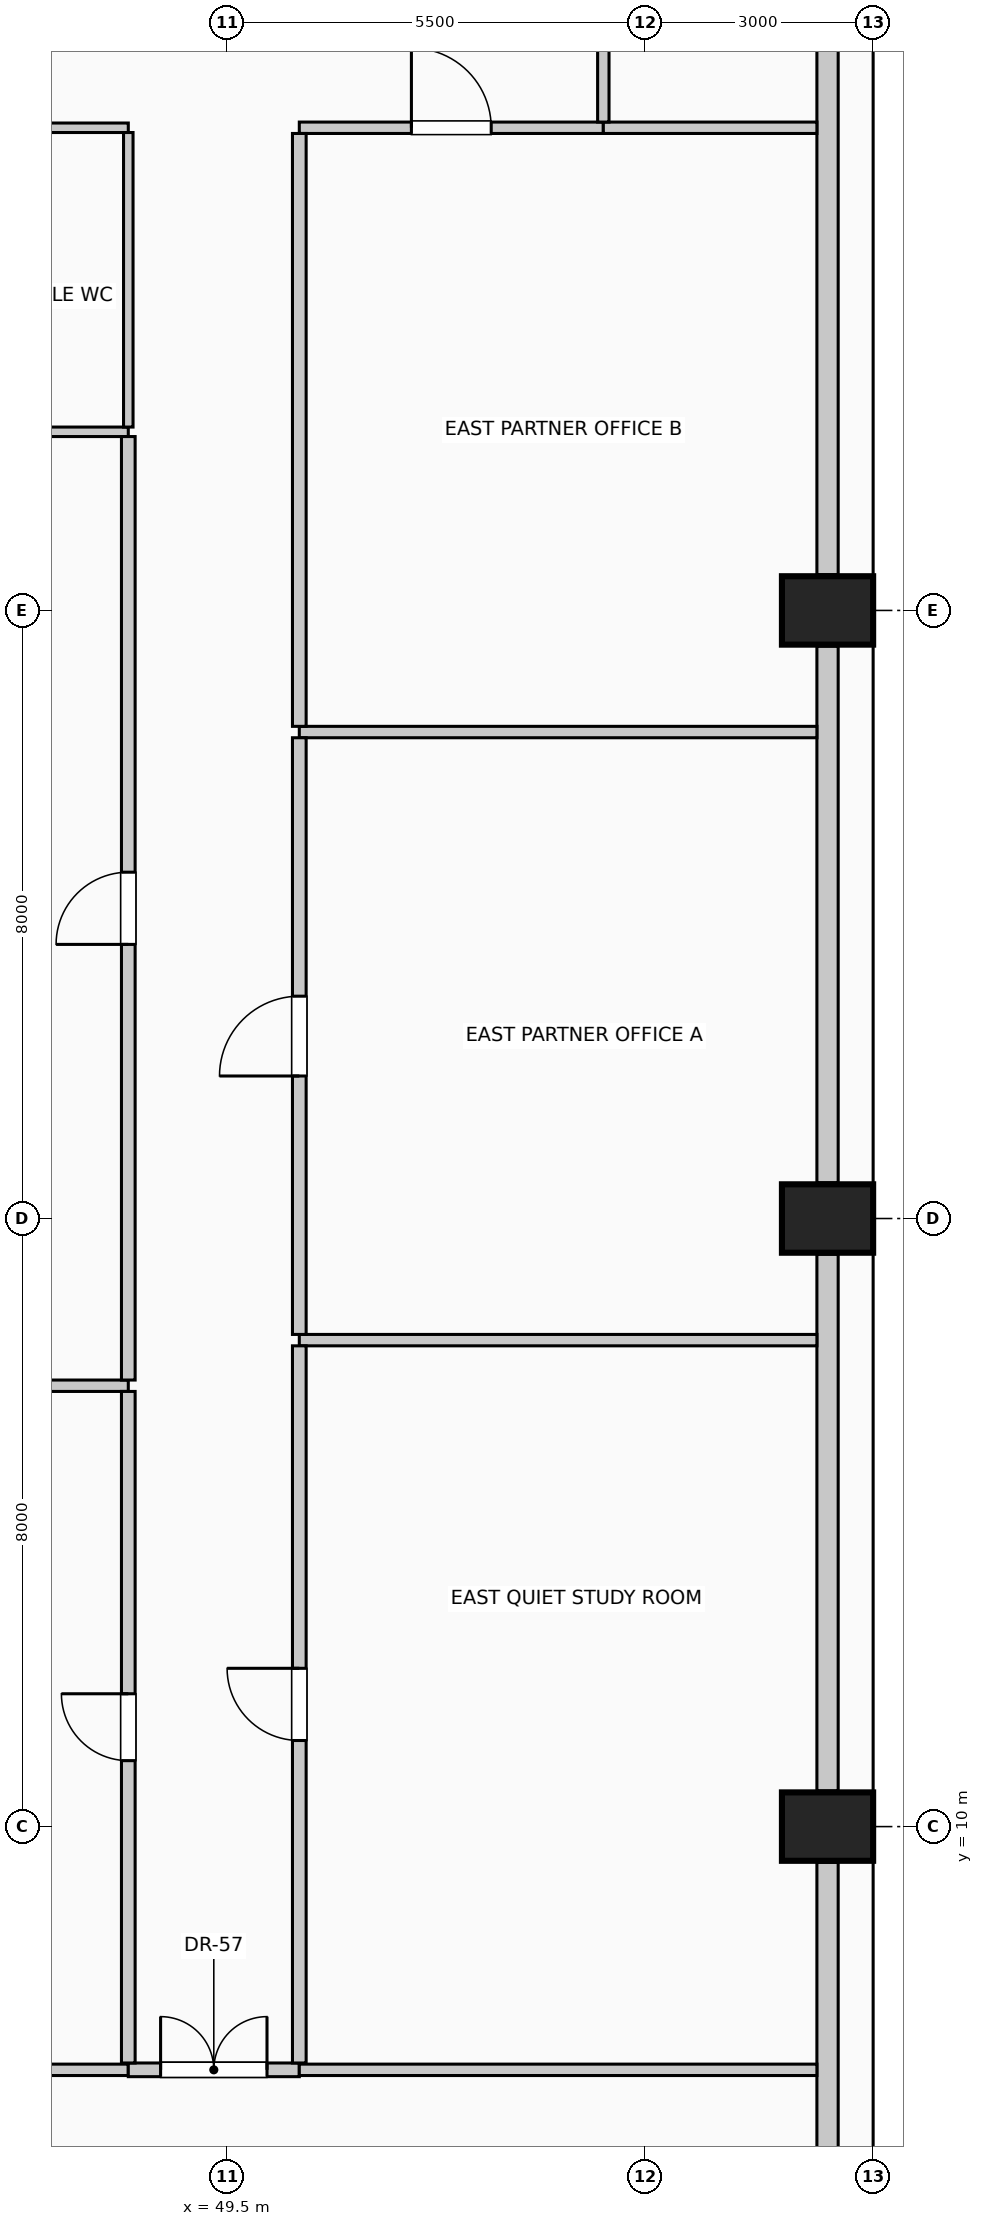
"""IFC4 building model, lengths in metres.
Left out: names, types, materials, properties, quantities, classifications, styles, units other than length and angle.
Written with IfcOpenShell. Run it as: python <this file> out.ifc"""

import sys

from ifc_helpers import new_model, si_unit, direction, frame, frame_2d, origin, origin_2d, place, context, subcontext, project, spatial, rectangle, extrude, element, fill, save


model = new_model("IFC4")
c1 = context("Model", 3, precision=1e-05, world=origin(), true_north=direction((0.0, 1.0)))
c2 = subcontext(c1, "Body", "Model", "MODEL_VIEW")
j1 = project(units=[si_unit("LENGTHUNIT", "METRE"), si_unit("PLANEANGLEUNIT", "RADIAN")], contexts=[c1])
p1 = place(None, origin())
s1 = spatial("IfcSite", under=j1, at=p1, CompositionType="ELEMENT")
p2 = place(p1, origin())
s2 = spatial("IfcBuilding", under=s1, at=p2, CompositionType="ELEMENT")
p3 = place(p2, frame((0.0, 0.0, 38.6)))
s3 = spatial("IfcBuildingStorey", under=s2, at=p3, CompositionType="ELEMENT", Elevation=38.6)
for number, where, z_axis, x_axis in (
    (1, (57.4, 10.0, 0.0), (0.0, 0.0, 1.0), (0.0, 1.0, 0.0)),
    (2, (57.4, 18.0, 0.0), (0.0, 0.0, 1.0), (0.0, 1.0, 0.0)),
    (3, (57.4, 26.0, 0.0), (0.0, 0.0, 1.0), (0.0, 1.0, 0.0)),
):
    element("IfcColumn", number, at=place(p3, frame(where, z_axis=z_axis, x_axis=x_axis)), inside=s3, PredefinedType="COLUMN", context=c2, shape_type="SweptSolid", body=[
        extrude(rectangle(XDim=0.9, YDim=1.2, at=origin_2d()), origin(), (0.0, 0.0, 1.0), 4.0),
    ])
p4 = place(p3, frame((57.4, 9.53, 0.0), z_axis=(0.0, 0.0, 1.0), x_axis=(0.0, -1.0, 0.0)))
e4 = element("IfcWall", 4, at=p4, inside=s3, PredefinedType="SOLIDWALL", context=c2, shape_type="SweptSolid", body=[
    extrude(rectangle(XDim=5.46, YDim=0.28, at=frame_2d((2.73, 0.0))), origin(), (0.0, 0.0, 1.0), 2.85),
])
for number, where, z_axis, x_axis in (
    (5, (57.4, 17.53, 0.0), (0.0, 0.0, 1.0), (0.0, -1.0, 0.0)),
    (6, (57.4, 25.53, 0.0), (0.0, 0.0, 1.0), (0.0, -1.0, 0.0)),
    (7, (57.4, 33.53, 0.0), (0.0, 0.0, 1.0), (0.0, -1.0, 0.0)),
):
    element("IfcWall", number, at=place(p3, frame(where, z_axis=z_axis, x_axis=x_axis)), inside=s3, PredefinedType="SOLIDWALL", context=c2, shape_type="SweptSolid", body=[
        extrude(rectangle(XDim=7.06, YDim=0.28, at=frame_2d((3.53, 0.0))), origin(), (0.0, 0.0, 1.0), 2.85),
    ])
p5 = place(p3, frame((41.12, 6.8, 0.0), z_axis=(0.0, 0.0, 1.0), x_axis=(1.0, 0.0, 0.0)))
e8 = element("IfcWall", 8, at=p5, inside=s3, PredefinedType="PARTITIONING", context=c2, shape_type="SweptSolid", body=[
    extrude(rectangle(XDim=7.08, YDim=0.15, at=frame_2d((3.54, 0.0))), origin(), (0.0, 0.0, 1.0), 3.095),
])
p6 = place(p3, frame((48.2, 6.8, 0.0), z_axis=(0.0, 0.0, 1.0), x_axis=(1.0, 0.0, 0.0)))
e9 = element("IfcWall", 9, at=p6, inside=s3, PredefinedType="PARTITIONING", context=c2, shape_type="SweptSolid", body=[
    extrude(rectangle(XDim=2.25, YDim=0.18, at=frame_2d((1.125, 0.0))), origin(), (0.0, 0.0, 1.0), 3.095),
])
p7 = place(p6, frame((0.425, 0.0, 0.0)))
e10 = element("IfcOpeningElement", 10, at=p7, cuts=e9, PredefinedType="OPENING", context=c2, shape_type="SweptSolid", body=[
    extrude(rectangle(XDim=1.4, YDim=2.2, at=frame_2d((0.7, 1.1))), frame((0.0, 0.1, 0.0), z_axis=(0.0, -1.0, 0.0), x_axis=(1.0, 0.0, 0.0)), (0.0, 0.0, 1.0), 0.2),
])
p8 = place(p3, frame((50.45, 6.8, 0.0), z_axis=(0.0, 0.0, 1.0), x_axis=(1.0, 0.0, 0.0)))
e11 = element("IfcWall", 11, at=p8, inside=s3, PredefinedType="PARTITIONING", context=c2, shape_type="SweptSolid", body=[
    extrude(rectangle(XDim=6.81, YDim=0.15, at=frame_2d((3.405, 0.0))), origin(), (0.0, 0.0, 1.0), 3.095),
])
p9 = place(p3, frame((41.12, 15.8, 0.0), z_axis=(0.0, 0.0, 1.0), x_axis=(1.0, 0.0, 0.0)))
e12 = element("IfcWall", 12, at=p9, inside=s3, PredefinedType="PARTITIONING", context=c2, shape_type="SweptSolid", body=[
    extrude(rectangle(XDim=7.08, YDim=0.15, at=frame_2d((3.54, 0.0))), origin(), (0.0, 0.0, 1.0), 3.7),
])
for number, where, z_axis, x_axis in (
    (13, (50.45, 16.4, 0.0), (0.0, 0.0, 1.0), (1.0, 0.0, 0.0)),
    (14, (50.45, 24.4, 0.0), (0.0, 0.0, 1.0), (1.0, 0.0, 0.0)),
):
    element("IfcWall", number, at=place(p3, frame(where, z_axis=z_axis, x_axis=x_axis)), inside=s3, PredefinedType="PARTITIONING", context=c2, shape_type="SweptSolid", body=[
        extrude(rectangle(XDim=6.81, YDim=0.15, at=frame_2d((3.405, 0.0))), origin(), (0.0, 0.0, 1.0), 3.7),
    ])
p10 = place(p3, frame((44.2, 28.35, 0.0), z_axis=(0.0, 0.0, 1.0), x_axis=(1.0, 0.0, 0.0)))
e15 = element("IfcWall", 15, at=p10, inside=s3, PredefinedType="PARTITIONING", context=c2, shape_type="SweptSolid", body=[
    extrude(rectangle(XDim=4.0, YDim=0.125, at=frame_2d((2.0, 0.0))), origin(), (0.0, 0.0, 1.0), 3.7),
])
p11 = place(p3, frame((44.2, 32.35, 0.0), z_axis=(0.0, 0.0, 1.0), x_axis=(1.0, 0.0, 0.0)))
e16 = element("IfcWall", 16, at=p11, inside=s3, PredefinedType="PARTITIONING", context=c2, shape_type="SweptSolid", body=[
    extrude(rectangle(XDim=4.0, YDim=0.125, at=frame_2d((2.0, 0.0))), origin(), (0.0, 0.0, 1.0), 3.7),
])
p12 = place(p11, frame((1.54, 0.0, 0.0)))
e17 = element("IfcOpeningElement", 17, at=p12, cuts=e16, PredefinedType="OPENING", context=c2, shape_type="SweptSolid", body=[
    extrude(rectangle(XDim=0.92, YDim=2.1, at=frame_2d((0.46, 1.05))), frame((0.0, 0.073, 0.0), z_axis=(0.0, -1.0, 0.0), x_axis=(1.0, 0.0, 0.0)), (0.0, 0.0, 1.0), 0.145),
])
p13 = place(p3, frame((50.45, 32.35, 0.0), z_axis=(0.0, 0.0, 1.0), x_axis=(1.0, 0.0, 0.0)))
e18 = element("IfcWall", 18, at=p13, inside=s3, PredefinedType="PARTITIONING", context=c2, shape_type="SweptSolid", body=[
    extrude(rectangle(XDim=4.0, YDim=0.15, at=frame_2d((2.0, 0.0))), origin(), (0.0, 0.0, 1.0), 3.7),
])
p14 = place(p13, frame((1.475, 0.0, 0.0)))
e19 = element("IfcOpeningElement", 19, at=p14, cuts=e18, PredefinedType="OPENING", context=c2, shape_type="SweptSolid", body=[
    extrude(rectangle(XDim=1.05, YDim=2.15, at=frame_2d((0.525, 1.075))), frame((0.0, 0.085, 0.0), z_axis=(0.0, -1.0, 0.0), x_axis=(1.0, 0.0, 0.0)), (0.0, 0.0, 1.0), 0.17),
])
p15 = place(p3, frame((54.45, 32.35, 0.0), z_axis=(0.0, 0.0, 1.0), x_axis=(1.0, 0.0, 0.0)))
e20 = element("IfcWall", 20, at=p15, inside=s3, PredefinedType="PARTITIONING", context=c2, shape_type="SweptSolid", body=[
    extrude(rectangle(XDim=2.81, YDim=0.15, at=frame_2d((1.405, 0.0))), origin(), (0.0, 0.0, 1.0), 3.7),
])
p16 = place(p3, frame((48.2, 6.89, 0.0), z_axis=(0.0, 0.0, 1.0), x_axis=(0.0, 1.0, 0.0)))
e21 = element("IfcWall", 21, at=p16, inside=s3, PredefinedType="PARTITIONING", context=c2, shape_type="SweptSolid", body=[
    extrude(rectangle(XDim=8.835, YDim=0.18, at=frame_2d((4.417, 0.0))), origin(), (0.0, 0.0, 1.0), 3.7),
])
p17 = place(p16, frame((3.978, 0.0, 0.0)))
e22 = element("IfcOpeningElement", 22, at=p17, cuts=e21, PredefinedType="OPENING", context=c2, shape_type="SweptSolid", body=[
    extrude(rectangle(XDim=0.88, YDim=2.1, at=frame_2d((0.44, 1.05))), frame((0.0, 0.1, 0.0), z_axis=(0.0, -1.0, 0.0), x_axis=(1.0, 0.0, 0.0)), (0.0, 0.0, 1.0), 0.2),
])
p18 = place(p3, frame((48.2, 15.875, 0.0), z_axis=(0.0, 0.0, 1.0), x_axis=(0.0, 1.0, 0.0)))
e23 = element("IfcWall", 23, at=p18, inside=s3, PredefinedType="PARTITIONING", context=c2, shape_type="SweptSolid", body=[
    extrude(rectangle(XDim=12.413, YDim=0.18, at=frame_2d((6.206, 0.0))), origin(), (0.0, 0.0, 1.0), 3.7),
])
p19 = place(p18, frame((5.731, 0.0, 0.0)))
e24 = element("IfcOpeningElement", 24, at=p19, cuts=e23, PredefinedType="OPENING", context=c2, shape_type="SweptSolid", body=[
    extrude(rectangle(XDim=0.95, YDim=2.15, at=frame_2d((0.475, 1.075))), frame((0.0, 0.1, 0.0), z_axis=(0.0, -1.0, 0.0), x_axis=(1.0, 0.0, 0.0)), (0.0, 0.0, 1.0), 0.2),
])
p20 = place(p3, frame((48.2, 28.413, 0.0), z_axis=(0.0, 0.0, 1.0), x_axis=(0.0, 1.0, 0.0)))
e25 = element("IfcWall", 25, at=p20, inside=s3, PredefinedType="PARTITIONING", context=c2, shape_type="SweptSolid", body=[
    extrude(rectangle(XDim=3.875, YDim=0.125, at=frame_2d((1.938, 0.0))), origin(), (0.0, 0.0, 1.0), 3.7),
])
p21 = place(p3, frame((50.45, 6.89, 0.0), z_axis=(0.0, 0.0, 1.0), x_axis=(0.0, 1.0, 0.0)))
e26 = element("IfcWall", 26, at=p21, inside=s3, PredefinedType="PARTITIONING", context=c2, shape_type="SweptSolid", body=[
    extrude(rectangle(XDim=9.435, YDim=0.18, at=frame_2d((4.718, 0.0))), origin(), (0.0, 0.0, 1.0), 3.7),
])
p22 = place(p21, frame((4.242, 0.0, 0.0)))
e27 = element("IfcOpeningElement", 27, at=p22, cuts=e26, PredefinedType="OPENING", context=c2, shape_type="SweptSolid", body=[
    extrude(rectangle(XDim=0.95, YDim=2.15, at=frame_2d((0.475, 1.075))), frame((0.0, 0.1, 0.0), z_axis=(0.0, -1.0, 0.0), x_axis=(1.0, 0.0, 0.0)), (0.0, 0.0, 1.0), 0.2),
])
p23 = place(p3, frame((50.45, 16.475, 0.0), z_axis=(0.0, 0.0, 1.0), x_axis=(0.0, 1.0, 0.0)))
e28 = element("IfcWall", 28, at=p23, inside=s3, PredefinedType="PARTITIONING", context=c2, shape_type="SweptSolid", body=[
    extrude(rectangle(XDim=7.85, YDim=0.18, at=frame_2d((3.925, 0.0))), origin(), (0.0, 0.0, 1.0), 3.7),
])
p24 = place(p23, frame((3.4, 0.0, 0.0)))
e29 = element("IfcOpeningElement", 29, at=p24, cuts=e28, PredefinedType="OPENING", context=c2, shape_type="SweptSolid", body=[
    extrude(rectangle(XDim=1.05, YDim=2.15, at=frame_2d((0.525, 1.075))), frame((0.0, 0.1, 0.0), z_axis=(0.0, -1.0, 0.0), x_axis=(1.0, 0.0, 0.0)), (0.0, 0.0, 1.0), 0.2),
])
p25 = place(p3, frame((50.45, 24.475, 0.0), z_axis=(0.0, 0.0, 1.0), x_axis=(0.0, 1.0, 0.0)))
e30 = element("IfcWall", 30, at=p25, inside=s3, PredefinedType="PARTITIONING", context=c2, shape_type="SweptSolid", body=[
    extrude(rectangle(XDim=7.8, YDim=0.18, at=frame_2d((3.9, 0.0))), origin(), (0.0, 0.0, 1.0), 3.7),
])
p26 = place(p3, frame((54.45, 32.425, 0.0), z_axis=(0.0, 0.0, 1.0), x_axis=(0.0, 1.0, 0.0)))
e31 = element("IfcWall", 31, at=p26, inside=s3, PredefinedType="PARTITIONING", context=c2, shape_type="SweptSolid", body=[
    extrude(rectangle(XDim=1.725, YDim=0.15, at=frame_2d((0.862, 0.0))), origin(), (0.0, 0.0, 1.0), 3.7),
])
p27 = place(p7, origin())
e32 = element("IfcDoor", 32, at=p27, inside=s3, OperationType="DOUBLE_DOOR_SINGLE_SWING", PredefinedType="DOOR", context=c2, shape_type="SweptSolid", body=[
    extrude(rectangle(XDim=1.4, YDim=2.2, at=frame_2d((0.7, 1.1))), frame((0.0, 0.025, 0.0), z_axis=(0.0, -1.0, 0.0), x_axis=(1.0, 0.0, 0.0)), (0.0, 0.0, 1.0), 0.05),
])
fill(e10, e32)
p28 = place(p14, origin())
e33 = element("IfcDoor", 33, at=p28, inside=s3, OperationType="SINGLE_SWING_LEFT", PredefinedType="DOOR", context=c2, shape_type="SweptSolid", body=[
    extrude(rectangle(XDim=1.05, YDim=2.15, at=frame_2d((0.525, 1.075))), frame((0.0, 0.025, 0.0), z_axis=(0.0, -1.0, 0.0), x_axis=(1.0, 0.0, 0.0)), (0.0, 0.0, 1.0), 0.05),
])
fill(e19, e33)
p29 = place(p17, origin())
e34 = element("IfcDoor", 34, at=p29, inside=s3, OperationType="SINGLE_SWING_RIGHT", PredefinedType="DOOR", context=c2, shape_type="SweptSolid", body=[
    extrude(rectangle(XDim=0.88, YDim=2.1, at=frame_2d((0.44, 1.05))), frame((0.0, 0.025, 0.0), z_axis=(0.0, -1.0, 0.0), x_axis=(1.0, 0.0, 0.0)), (0.0, 0.0, 1.0), 0.05),
])
fill(e22, e34)
p30 = place(p19, origin())
e35 = element("IfcDoor", 35, at=p30, inside=s3, OperationType="SINGLE_SWING_LEFT", PredefinedType="DOOR", context=c2, shape_type="SweptSolid", body=[
    extrude(rectangle(XDim=0.95, YDim=2.15, at=frame_2d((0.475, 1.075))), frame((0.0, 0.025, 0.0), z_axis=(0.0, -1.0, 0.0), x_axis=(1.0, 0.0, 0.0)), (0.0, 0.0, 1.0), 0.05),
])
fill(e24, e35)
p31 = place(p22, origin())
e36 = element("IfcDoor", 36, at=p31, inside=s3, OperationType="SINGLE_SWING_RIGHT", PredefinedType="DOOR", context=c2, shape_type="SweptSolid", body=[
    extrude(rectangle(XDim=0.95, YDim=2.15, at=frame_2d((0.475, 1.075))), frame((0.0, 0.025, 0.0), z_axis=(0.0, -1.0, 0.0), x_axis=(1.0, 0.0, 0.0)), (0.0, 0.0, 1.0), 0.05),
])
fill(e27, e36)
p32 = place(p24, origin())
e37 = element("IfcDoor", 37, at=p32, inside=s3, OperationType="SINGLE_SWING_LEFT", PredefinedType="DOOR", context=c2, shape_type="SweptSolid", body=[
    extrude(rectangle(XDim=1.05, YDim=2.15, at=frame_2d((0.525, 1.075))), frame((0.0, 0.025, 0.0), z_axis=(0.0, -1.0, 0.0), x_axis=(1.0, 0.0, 0.0)), (0.0, 0.0, 1.0), 0.05),
])
fill(e29, e37)
save(model, sys.argv[1])
